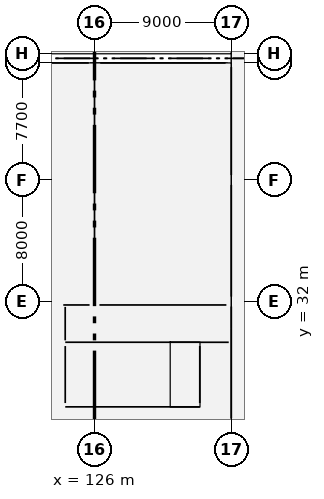
"""IFC4 building model, lengths in metres.
Left out: names, types, materials, properties, quantities, classifications, styles, units other than length and angle.
Written with IfcOpenShell. Run it as: python <this file> out.ifc"""

import sys

from ifc_helpers import new_model, si_unit, direction, frame, frame_2d, origin, origin_2d, place, context, subcontext, project, spatial, rectangle, extrude, element, fill, save


model = new_model("IFC4")
c1 = context("Model", 3, precision=1e-05, world=origin(), true_north=direction((0.0, 1.0)))
c2 = subcontext(c1, "Body", "Model", "MODEL_VIEW")
j1 = project(units=[si_unit("LENGTHUNIT", "METRE"), si_unit("PLANEANGLEUNIT", "RADIAN")], contexts=[c1])
p1 = place(None, origin())
s1 = spatial("IfcSite", under=j1, at=p1, CompositionType="ELEMENT")
p2 = place(p1, origin())
s2 = spatial("IfcBuilding", under=s1, at=p2, CompositionType="ELEMENT")
p3 = place(p2, origin())
s3 = spatial("IfcBuildingStorey", under=s2, at=p3, CompositionType="ELEMENT", Elevation=0.0)
for number, where, z_axis, x_axis in (
    (1, (126.0, 24.0, -0.5), (0.0, 0.0, 1.0), (1.0, 0.0, 0.0)),
    (2, (126.0, 32.0, -0.5), (0.0, 0.0, 1.0), (1.0, 0.0, 0.0)),
    (3, (126.0, 40.0, -0.5), (0.0, 0.0, 1.0), (1.0, 0.0, 0.0)),
):
    element("IfcColumn", number, at=place(p3, frame(where, z_axis=z_axis, x_axis=x_axis)), inside=s3, PredefinedType="COLUMN", context=c2, shape_type="SweptSolid", body=[
        extrude(rectangle(XDim=0.65, YDim=0.65, at=origin_2d()), origin(), (0.0, 0.0, 1.0), 6.8),
    ])
p4 = place(p3, frame((126.0, 47.7, -0.5), z_axis=(0.0, 0.0, 1.0), x_axis=(1.0, 0.0, 0.0)))
e4 = element("IfcColumn", 4, at=p4, inside=s3, PredefinedType="COLUMN", context=c2, shape_type="SweptSolid", body=[
    extrude(rectangle(XDim=0.75, YDim=0.55, at=origin_2d()), origin(), (0.0, 0.0, 1.0), 6.8),
])
p5 = place(p3, frame((126.0, 48.3, -0.5), z_axis=(0.0, 0.0, 1.0), x_axis=(1.0, 0.0, 0.0)))
e5 = element("IfcColumn", 5, at=p5, inside=s3, PredefinedType="COLUMN", context=c2, shape_type="SweptSolid", body=[
    extrude(rectangle(XDim=0.75, YDim=0.55, at=origin_2d()), origin(), (0.0, 0.0, 1.0), 7.3),
])
for number, where, z_axis, x_axis in (
    (6, (135.0, 24.0, -0.5), (0.0, 0.0, 1.0), (1.0, 0.0, 0.0)),
    (7, (135.0, 32.0, -0.5), (0.0, 0.0, 1.0), (1.0, 0.0, 0.0)),
    (8, (135.0, 40.0, -0.5), (0.0, 0.0, 1.0), (1.0, 0.0, 0.0)),
):
    element("IfcColumn", number, at=place(p3, frame(where, z_axis=z_axis, x_axis=x_axis)), inside=s3, PredefinedType="COLUMN", context=c2, shape_type="SweptSolid", body=[
        extrude(rectangle(XDim=0.65, YDim=0.65, at=origin_2d()), origin(), (0.0, 0.0, 1.0), 6.8),
    ])
p6 = place(p3, frame((135.0, 47.7, -0.5), z_axis=(0.0, 0.0, 1.0), x_axis=(1.0, 0.0, 0.0)))
e9 = element("IfcColumn", 9, at=p6, inside=s3, PredefinedType="COLUMN", context=c2, shape_type="SweptSolid", body=[
    extrude(rectangle(XDim=0.75, YDim=0.55, at=origin_2d()), origin(), (0.0, 0.0, 1.0), 6.8),
])
p7 = place(p3, frame((135.0, 48.3, -0.5), z_axis=(0.0, 0.0, 1.0), x_axis=(1.0, 0.0, 0.0)))
e10 = element("IfcColumn", 10, at=p7, inside=s3, PredefinedType="COLUMN", context=c2, shape_type="SweptSolid", body=[
    extrude(rectangle(XDim=0.75, YDim=0.55, at=origin_2d()), origin(), (0.0, 0.0, 1.0), 7.3),
])
p8 = place(p3, frame((117.375, 47.7, 0.0), z_axis=(0.0, 0.0, 1.0), x_axis=(1.0, 0.0, 0.0)))
e11 = element("IfcWall", 11, at=p8, inside=s3, PredefinedType="SOLIDWALL", context=c2, shape_type="SweptSolid", body=[
    extrude(rectangle(XDim=8.25, YDim=0.34, at=frame_2d((4.125, 0.0))), origin(), (0.0, 0.0, 1.0), 5.1),
])
p9 = place(p8, frame((1.85, 0.0, 0.85)))
e12 = element("IfcOpeningElement", 12, at=p9, cuts=e11, PredefinedType="OPENING", context=c2, shape_type="SweptSolid", body=[
    extrude(rectangle(XDim=1.8, YDim=3.15, at=frame_2d((0.9, 1.575))), frame((0.0, 0.18, 0.0), z_axis=(0.0, -1.0, 0.0), x_axis=(1.0, 0.0, 0.0)), (0.0, 0.0, 1.0), 0.36),
])
p10 = place(p8, frame((4.6, 0.0, 0.85)))
e13 = element("IfcOpeningElement", 13, at=p10, cuts=e11, PredefinedType="OPENING", context=c2, shape_type="SweptSolid", body=[
    extrude(rectangle(XDim=1.8, YDim=3.15, at=frame_2d((0.9, 1.575))), frame((0.0, 0.18, 0.0), z_axis=(0.0, -1.0, 0.0), x_axis=(1.0, 0.0, 0.0)), (0.0, 0.0, 1.0), 0.36),
])
p11 = place(p3, frame((126.375, 47.7, 0.0), z_axis=(0.0, 0.0, 1.0), x_axis=(1.0, 0.0, 0.0)))
e14 = element("IfcWall", 14, at=p11, inside=s3, PredefinedType="SOLIDWALL", context=c2, shape_type="SweptSolid", body=[
    extrude(rectangle(XDim=8.25, YDim=0.34, at=frame_2d((4.125, 0.0))), origin(), (0.0, 0.0, 1.0), 5.1),
])
p12 = place(p11, frame((3.125, 0.0, 0.0)))
e15 = element("IfcOpeningElement", 15, at=p12, cuts=e14, PredefinedType="OPENING", context=c2, shape_type="SweptSolid", body=[
    extrude(rectangle(XDim=2.0, YDim=2.75, at=frame_2d((1.0, 1.375))), frame((0.0, 0.18, 0.0), z_axis=(0.0, -1.0, 0.0), x_axis=(1.0, 0.0, 0.0)), (0.0, 0.0, 1.0), 0.36),
])
p13 = place(p3, frame((135.0, 24.325, 0.0), z_axis=(0.0, 0.0, 1.0), x_axis=(0.0, 1.0, 0.0)))
e16 = element("IfcWall", 16, at=p13, inside=s3, PredefinedType="SOLIDWALL", context=c2, shape_type="SweptSolid", body=[
    extrude(rectangle(XDim=5.925, YDim=0.34, at=frame_2d((2.962, 0.0))), origin(), (0.0, 0.0, 1.0), 5.35),
])
p14 = place(p13, frame((0.619, 0.0, 0.85)))
e17 = element("IfcOpeningElement", 17, at=p14, cuts=e16, PredefinedType="OPENING", context=c2, shape_type="SweptSolid", body=[
    extrude(rectangle(XDim=2.0, YDim=3.3, at=frame_2d((1.0, 1.65))), frame((0.0, 0.18, 0.0), z_axis=(0.0, -1.0, 0.0), x_axis=(1.0, 0.0, 0.0)), (0.0, 0.0, 1.0), 0.36),
])
p15 = place(p13, frame((2.82, 0.0, 0.85)))
e18 = element("IfcOpeningElement", 18, at=p15, cuts=e16, PredefinedType="OPENING", context=c2, shape_type="SweptSolid", body=[
    extrude(rectangle(XDim=2.0, YDim=3.3, at=frame_2d((1.0, 1.65))), frame((0.0, 0.18, 0.0), z_axis=(0.0, -1.0, 0.0), x_axis=(1.0, 0.0, 0.0)), (0.0, 0.0, 1.0), 0.36),
])
p16 = place(p3, frame((135.0, 32.325, 0.0), z_axis=(0.0, 0.0, 1.0), x_axis=(0.0, 1.0, 0.0)))
e19 = element("IfcWall", 19, at=p16, inside=s3, PredefinedType="SOLIDWALL", context=c2, shape_type="SweptSolid", body=[
    extrude(rectangle(XDim=7.35, YDim=0.34, at=frame_2d((3.675, 0.0))), origin(), (0.0, 0.0, 1.0), 5.35),
])
p17 = place(p16, frame((1.55, 0.0, 0.85)))
e20 = element("IfcOpeningElement", 20, at=p17, cuts=e19, PredefinedType="OPENING", context=c2, shape_type="SweptSolid", body=[
    extrude(rectangle(XDim=1.8, YDim=3.15, at=frame_2d((0.9, 1.575))), frame((0.0, 0.18, 0.0), z_axis=(0.0, -1.0, 0.0), x_axis=(1.0, 0.0, 0.0)), (0.0, 0.0, 1.0), 0.36),
])
p18 = place(p16, frame((4.0, 0.0, 0.85)))
e21 = element("IfcOpeningElement", 21, at=p18, cuts=e19, PredefinedType="OPENING", context=c2, shape_type="SweptSolid", body=[
    extrude(rectangle(XDim=1.8, YDim=3.15, at=frame_2d((0.9, 1.575))), frame((0.0, 0.18, 0.0), z_axis=(0.0, -1.0, 0.0), x_axis=(1.0, 0.0, 0.0)), (0.0, 0.0, 1.0), 0.36),
])
p19 = place(p3, frame((135.0, 40.325, 0.0), z_axis=(0.0, 0.0, 1.0), x_axis=(0.0, 1.0, 0.0)))
e22 = element("IfcWall", 22, at=p19, inside=s3, PredefinedType="SOLIDWALL", context=c2, shape_type="SweptSolid", body=[
    extrude(rectangle(XDim=7.1, YDim=0.34, at=frame_2d((3.55, 0.0))), origin(), (0.0, 0.0, 1.0), 5.35),
])
p20 = place(p19, frame((1.467, 0.0, 0.85)))
e23 = element("IfcOpeningElement", 23, at=p20, cuts=e22, PredefinedType="OPENING", context=c2, shape_type="SweptSolid", body=[
    extrude(rectangle(XDim=1.8, YDim=3.15, at=frame_2d((0.9, 1.575))), frame((0.0, 0.18, 0.0), z_axis=(0.0, -1.0, 0.0), x_axis=(1.0, 0.0, 0.0)), (0.0, 0.0, 1.0), 0.36),
])
p21 = place(p19, frame((3.833, 0.0, 0.85)))
e24 = element("IfcOpeningElement", 24, at=p21, cuts=e22, PredefinedType="OPENING", context=c2, shape_type="SweptSolid", body=[
    extrude(rectangle(XDim=1.8, YDim=3.15, at=frame_2d((0.9, 1.575))), frame((0.0, 0.18, 0.0), z_axis=(0.0, -1.0, 0.0), x_axis=(1.0, 0.0, 0.0)), (0.0, 0.0, 1.0), 0.36),
])
p22 = place(p3, frame((124.075, 25.075, -0.5), z_axis=(0.0, 0.0, 1.0), x_axis=(1.0, 0.0, 0.0)))
e25 = element("IfcWall", 25, at=p22, inside=s3, PredefinedType="SOLIDWALL", context=c2, shape_type="SweptSolid", body=[
    extrude(rectangle(XDim=8.85, YDim=0.25, at=frame_2d((4.425, 0.0))), origin(), (0.0, 0.0, 1.0), 6.8),
])
p23 = place(p3, frame((124.075, 29.325, -0.5), z_axis=(0.0, 0.0, 1.0), x_axis=(1.0, 0.0, 0.0)))
e26 = element("IfcWall", 26, at=p23, inside=s3, PredefinedType="SOLIDWALL", context=c2, shape_type="SweptSolid", body=[
    extrude(rectangle(XDim=8.85, YDim=0.25, at=frame_2d((4.425, 0.0))), origin(), (0.0, 0.0, 1.0), 6.8),
])
p24 = place(p23, frame((0.375, 0.0, 0.5)))
e27 = element("IfcOpeningElement", 27, at=p24, cuts=e26, PredefinedType="OPENING", context=c2, shape_type="SweptSolid", body=[
    extrude(rectangle(XDim=1.2, YDim=2.2, at=frame_2d((0.6, 1.1))), frame((0.0, 0.135, 0.0), z_axis=(0.0, -1.0, 0.0), x_axis=(1.0, 0.0, 0.0)), (0.0, 0.0, 1.0), 0.27),
])
p25 = place(p3, frame((124.075, 25.325, -0.5), z_axis=(0.0, 0.0, 1.0), x_axis=(0.0, 1.0, 0.0)))
e28 = element("IfcWall", 28, at=p25, inside=s3, PredefinedType="SOLIDWALL", context=c2, shape_type="SweptSolid", body=[
    extrude(rectangle(XDim=3.75, YDim=0.25, at=frame_2d((1.875, 0.0))), origin(), (0.0, 0.0, 1.0), 6.8),
])
p26 = place(p25, frame((1.1, 0.0, 0.5)))
e29 = element("IfcOpeningElement", 29, at=p26, cuts=e28, PredefinedType="OPENING", context=c2, shape_type="SweptSolid", body=[
    extrude(rectangle(XDim=1.2, YDim=2.2, at=frame_2d((0.6, 1.1))), frame((0.0, 0.135, 0.0), z_axis=(0.0, -1.0, 0.0), x_axis=(1.0, 0.0, 0.0)), (0.0, 0.0, 1.0), 0.27),
])
p27 = place(p3, frame((132.925, 25.325, -0.5), z_axis=(0.0, 0.0, 1.0), x_axis=(0.0, 1.0, 0.0)))
e30 = element("IfcWall", 30, at=p27, inside=s3, PredefinedType="SOLIDWALL", context=c2, shape_type="SweptSolid", body=[
    extrude(rectangle(XDim=3.75, YDim=0.25, at=frame_2d((1.875, 0.0))), origin(), (0.0, 0.0, 1.0), 6.8),
])
p28 = place(p3, frame((126.0, 32.3, 0.0), z_axis=(0.0, 0.0, 1.0), x_axis=(0.0, 1.0, 0.0)))
e31 = element("IfcWall", 31, at=p28, inside=s3, PredefinedType="PARTITIONING", context=c2, shape_type="SweptSolid", body=[
    extrude(rectangle(XDim=14.95, YDim=0.1, at=frame_2d((7.475, 0.0))), origin(), (0.0, 0.0, 1.0), 5.35),
])
p29 = place(p28, frame((3.38, 0.0, 0.0)))
e32 = element("IfcOpeningElement", 32, at=p29, cuts=e31, PredefinedType="OPENING", context=c2, shape_type="SweptSolid", body=[
    extrude(rectangle(XDim=0.94, YDim=2.14, at=frame_2d((0.47, 1.07))), frame((0.0, 0.06, 0.0), z_axis=(0.0, -1.0, 0.0), x_axis=(1.0, 0.0, 0.0)), (0.0, 0.0, 1.0), 0.12),
])
p30 = place(p3, frame((124.073, 29.45, 0.0), z_axis=(0.0, 0.0, 1.0), x_axis=(0.0, 1.0, 0.0)))
e33 = element("IfcWall", 33, at=p30, inside=s3, PredefinedType="STANDARD", context=c2, shape_type="SweptSolid", body=[
    extrude(rectangle(XDim=2.2, YDim=0.255, at=frame_2d((1.1, 0.0))), origin(), (0.0, 0.0, 1.0), 5.95),
])
p31 = place(p3, frame((132.925, 29.323, 0.0), z_axis=(0.0, 0.0, 1.0), x_axis=(1.0, 0.0, 0.0)))
e34 = element("IfcWall", 34, at=p31, inside=s3, PredefinedType="STANDARD", context=c2, shape_type="SweptSolid", body=[
    extrude(rectangle(XDim=1.905, YDim=0.255, at=frame_2d((0.953, 0.0))), origin(), (0.0, 0.0, 1.0), 5.95),
])
p32 = place(p3, frame((123.945, 31.778, 0.0), z_axis=(0.0, 0.0, 1.0), x_axis=(1.0, 0.0, 0.0)))
e35 = element("IfcWall", 35, at=p32, inside=s3, PredefinedType="STANDARD", context=c2, shape_type="SweptSolid", body=[
    extrude(rectangle(XDim=1.73, YDim=0.255, at=frame_2d((0.865, 0.0))), origin(), (0.0, 0.0, 1.0), 5.95),
])
p33 = place(p3, frame((126.325, 31.778, 0.0), z_axis=(0.0, 0.0, 1.0), x_axis=(1.0, 0.0, 0.0)))
e36 = element("IfcWall", 36, at=p33, inside=s3, PredefinedType="STANDARD", context=c2, shape_type="SweptSolid", body=[
    extrude(rectangle(XDim=8.35, YDim=0.255, at=frame_2d((4.175, 0.0))), origin(), (0.0, 0.0, 1.0), 5.95),
])
p34 = place(p3, frame((135.0, 31.675, 0.0), z_axis=(0.0, 0.0, 1.0), x_axis=(0.0, -1.0, 0.0)))
e37 = element("IfcWall", 37, at=p34, inside=s3, PredefinedType="SOLIDWALL", context=c2, shape_type="SweptSolid", body=[
    extrude(rectangle(XDim=1.425, YDim=0.34, at=frame_2d((0.712, 0.0))), origin(), (0.0, 0.0, 1.0), 5.35),
])
p35 = place(p34, frame((0.125, 0.0, 0.0)))
e38 = element("IfcOpeningElement", 38, at=p35, cuts=e37, PredefinedType="OPENING", context=c2, shape_type="SweptSolid", body=[
    extrude(rectangle(XDim=1.2, YDim=2.25, at=frame_2d((0.6, 1.125))), frame((0.0, 0.18, 0.0), z_axis=(0.0, -1.0, 0.0), x_axis=(1.0, 0.0, 0.0)), (0.0, 0.0, 1.0), 0.36),
])
p36 = place(p10, origin())
e39 = element("IfcWindow", 39, at=p36, inside=s3, PartitioningType="DOUBLE_PANEL_VERTICAL", PredefinedType="WINDOW", context=c2, shape_type="SweptSolid", body=[
    extrude(rectangle(XDim=1.8, YDim=3.15, at=frame_2d((0.9, 1.575))), frame((0.0, 0.03, 0.0), z_axis=(0.0, -1.0, 0.0), x_axis=(1.0, 0.0, 0.0)), (0.0, 0.0, 1.0), 0.06),
])
fill(e13, e39)
p37 = place(p12, origin())
e40 = element("IfcDoor", 40, at=p37, inside=s3, OperationType="DOUBLE_DOOR_SINGLE_SWING", PredefinedType="DOOR", context=c2, shape_type="SweptSolid", body=[
    extrude(rectangle(XDim=2.0, YDim=2.75, at=frame_2d((1.0, 1.375))), frame((0.0, 0.025, 0.0), z_axis=(0.0, -1.0, 0.0), x_axis=(1.0, 0.0, 0.0)), (0.0, 0.0, 1.0), 0.05),
])
fill(e15, e40)
p38 = place(p14, origin())
e41 = element("IfcWindow", 41, at=p38, inside=s3, PartitioningType="DOUBLE_PANEL_VERTICAL", PredefinedType="WINDOW", context=c2, shape_type="SweptSolid", body=[
    extrude(rectangle(XDim=2.0, YDim=3.3, at=frame_2d((1.0, 1.65))), frame((0.0, 0.03, 0.0), z_axis=(0.0, -1.0, 0.0), x_axis=(1.0, 0.0, 0.0)), (0.0, 0.0, 1.0), 0.06),
])
fill(e17, e41)
p39 = place(p15, origin())
e42 = element("IfcWindow", 42, at=p39, inside=s3, PartitioningType="DOUBLE_PANEL_VERTICAL", PredefinedType="WINDOW", context=c2, shape_type="SweptSolid", body=[
    extrude(rectangle(XDim=2.0, YDim=3.3, at=frame_2d((1.0, 1.65))), frame((0.0, 0.03, 0.0), z_axis=(0.0, -1.0, 0.0), x_axis=(1.0, 0.0, 0.0)), (0.0, 0.0, 1.0), 0.06),
])
fill(e18, e42)
p40 = place(p17, origin())
e43 = element("IfcWindow", 43, at=p40, inside=s3, PartitioningType="DOUBLE_PANEL_VERTICAL", PredefinedType="WINDOW", context=c2, shape_type="SweptSolid", body=[
    extrude(rectangle(XDim=1.8, YDim=3.15, at=frame_2d((0.9, 1.575))), frame((0.0, 0.03, 0.0), z_axis=(0.0, -1.0, 0.0), x_axis=(1.0, 0.0, 0.0)), (0.0, 0.0, 1.0), 0.06),
])
fill(e20, e43)
p41 = place(p18, origin())
e44 = element("IfcWindow", 44, at=p41, inside=s3, PartitioningType="DOUBLE_PANEL_VERTICAL", PredefinedType="WINDOW", context=c2, shape_type="SweptSolid", body=[
    extrude(rectangle(XDim=1.8, YDim=3.15, at=frame_2d((0.9, 1.575))), frame((0.0, 0.03, 0.0), z_axis=(0.0, -1.0, 0.0), x_axis=(1.0, 0.0, 0.0)), (0.0, 0.0, 1.0), 0.06),
])
fill(e21, e44)
p42 = place(p20, origin())
e45 = element("IfcWindow", 45, at=p42, inside=s3, PartitioningType="DOUBLE_PANEL_VERTICAL", PredefinedType="WINDOW", context=c2, shape_type="SweptSolid", body=[
    extrude(rectangle(XDim=1.8, YDim=3.15, at=frame_2d((0.9, 1.575))), frame((0.0, 0.03, 0.0), z_axis=(0.0, -1.0, 0.0), x_axis=(1.0, 0.0, 0.0)), (0.0, 0.0, 1.0), 0.06),
])
fill(e23, e45)
p43 = place(p21, origin())
e46 = element("IfcWindow", 46, at=p43, inside=s3, PartitioningType="DOUBLE_PANEL_VERTICAL", PredefinedType="WINDOW", context=c2, shape_type="SweptSolid", body=[
    extrude(rectangle(XDim=1.8, YDim=3.15, at=frame_2d((0.9, 1.575))), frame((0.0, 0.03, 0.0), z_axis=(0.0, -1.0, 0.0), x_axis=(1.0, 0.0, 0.0)), (0.0, 0.0, 1.0), 0.06),
])
fill(e24, e46)
p44 = place(p26, origin())
e47 = element("IfcDoor", 47, at=p44, inside=s3, OperationType="SINGLE_SWING_LEFT", PredefinedType="DOOR", context=c2, shape_type="SweptSolid", body=[
    extrude(rectangle(XDim=1.2, YDim=2.2, at=frame_2d((0.6, 1.1))), frame((0.0, 0.025, 0.0), z_axis=(0.0, -1.0, 0.0), x_axis=(1.0, 0.0, 0.0)), (0.0, 0.0, 1.0), 0.05),
])
fill(e29, e47)
p45 = place(p29, origin())
e48 = element("IfcDoor", 48, at=p45, inside=s3, OperationType="SINGLE_SWING_LEFT", PredefinedType="DOOR", context=c2, shape_type="SweptSolid", body=[
    extrude(rectangle(XDim=0.94, YDim=2.14, at=frame_2d((0.47, 1.07))), frame((0.0, 0.025, 0.0), z_axis=(0.0, -1.0, 0.0), x_axis=(1.0, 0.0, 0.0)), (0.0, 0.0, 1.0), 0.05),
])
fill(e32, e48)
p46 = place(p24, origin())
e49 = element("IfcDoor", 49, at=p46, inside=s3, OperationType="SINGLE_SWING_RIGHT", PredefinedType="DOOR", context=c2, shape_type="SweptSolid", body=[
    extrude(rectangle(XDim=1.2, YDim=2.2, at=frame_2d((0.6, 1.1))), frame((0.0, 0.025, 0.0), z_axis=(0.0, -1.0, 0.0), x_axis=(1.0, 0.0, 0.0)), (0.0, 0.0, 1.0), 0.05),
])
fill(e27, e49)
p47 = place(p35, origin())
e50 = element("IfcDoor", 50, at=p47, inside=s3, OperationType="SINGLE_SWING_LEFT", PredefinedType="DOOR", context=c2, shape_type="SweptSolid", body=[
    extrude(rectangle(XDim=1.2, YDim=2.25, at=frame_2d((0.6, 1.125))), frame((0.0, 0.025, 0.0), z_axis=(0.0, -1.0, 0.0), x_axis=(1.0, 0.0, 0.0)), (0.0, 0.0, 1.0), 0.05),
])
fill(e38, e50)
save(model, sys.argv[1])
